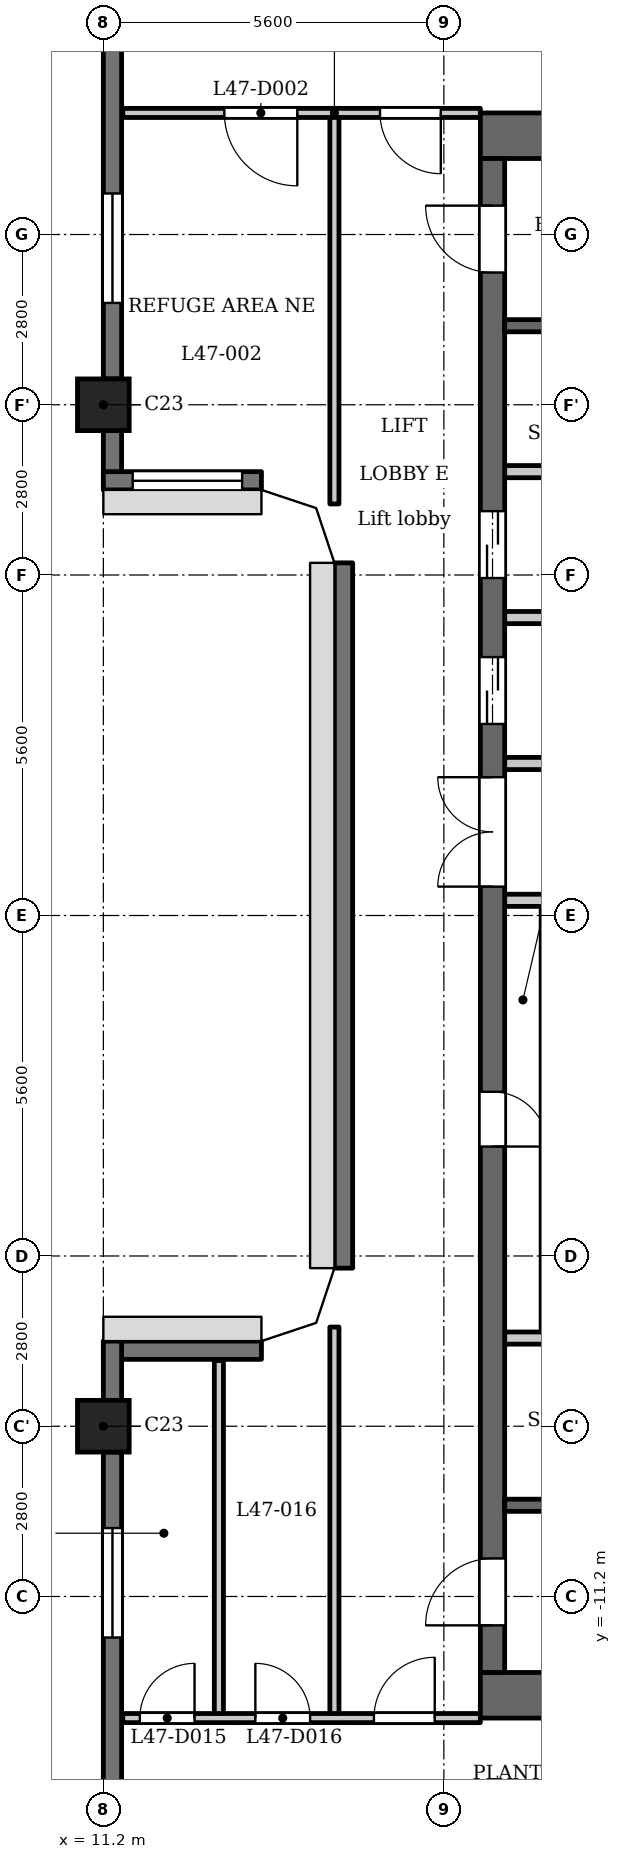
"""IFC4 building model, lengths in metres.
Left out: names, types, materials, properties, quantities, classifications, styles, units other than length and angle.
Written with IfcOpenShell. Run it as: python <this file> out.ifc"""

import sys

from ifc_helpers import new_model, si_unit, direction, frame, frame_2d, origin, origin_2d, place, context, subcontext, project, spatial, polyline, rectangle, outline, extrude, element, fill, save


model = new_model("IFC4")
c1 = context("Model", 3, precision=1e-05, world=origin(), true_north=direction((0.0, 1.0)))
c2 = subcontext(c1, "Body", "Model", "MODEL_VIEW")
j1 = project(units=[si_unit("LENGTHUNIT", "METRE"), si_unit("PLANEANGLEUNIT", "RADIAN")], contexts=[c1])
p1 = place(None, origin())
s1 = spatial("IfcSite", under=j1, at=p1, CompositionType="ELEMENT")
p2 = place(p1, origin())
s2 = spatial("IfcBuilding", under=s1, at=p2, CompositionType="ELEMENT")
p3 = place(p2, frame((0.0, 0.0, 183.5)))
s3 = spatial("IfcBuildingStorey", under=s2, at=p3, CompositionType="ELEMENT", Elevation=183.5)
for number, where, z_axis, x_axis in (
    (1, (11.2, -8.4, 0.0), (0.0, 0.0, 1.0), (1.0, 0.0, 0.0)),
    (2, (11.2, 8.4, 0.0), (0.0, 0.0, 1.0), (1.0, 0.0, 0.0)),
):
    element("IfcColumn", number, at=place(p3, frame(where, z_axis=z_axis, x_axis=x_axis)), inside=s3, PredefinedType="COLUMN", context=c2, shape_type="SweptSolid", body=[
        extrude(rectangle(XDim=0.85, YDim=0.85, at=origin_2d()), origin(), (0.0, 0.0, 1.0), 5.4),
    ])
p4 = place(p3, frame((13.8, -7.15, 0.0), z_axis=(0.0, 0.0, 1.0), x_axis=(-1.0, 0.0, 0.0)))
e3 = element("IfcWall", 3, at=p4, inside=s3, PredefinedType="SOLIDWALL", context=c2, shape_type="SweptSolid", body=[
    extrude(rectangle(XDim=2.6, YDim=0.3, at=frame_2d((1.3, 0.0))), origin(), (0.0, 0.0, 1.0), 4.6),
])
p5 = place(p3, frame((11.35, -7.0, 0.0), z_axis=(0.0, 0.0, 1.0), x_axis=(0.0, -1.0, 0.0)))
e4 = element("IfcWall", 4, at=p5, inside=s3, PredefinedType="SOLIDWALL", context=c2, shape_type="SweptSolid", body=[
    extrude(rectangle(XDim=0.975, YDim=0.3, at=frame_2d((0.488, 0.0))), origin(), (0.0, 0.0, 1.0), 4.6),
])
p6 = place(p3, frame((11.35, -8.825, 0.0), z_axis=(0.0, 0.0, 1.0), x_axis=(0.0, -1.0, 0.0)))
e5 = element("IfcWall", 5, at=p6, inside=s3, PredefinedType="SOLIDWALL", context=c2, shape_type="SweptSolid", body=[
    extrude(rectangle(XDim=6.2, YDim=0.3, at=frame_2d((3.1, 0.0))), origin(), (0.0, 0.0, 1.0), 4.6),
])
p7 = place(p6, frame((1.25, 0.0, 0.9)))
e6 = element("IfcOpeningElement", 6, at=p7, cuts=e5, PredefinedType="OPENING", context=c2, shape_type="SweptSolid", body=[
    extrude(rectangle(XDim=1.8, YDim=1.5, at=frame_2d((0.9, 0.75))), frame((0.0, 0.16, 0.0), z_axis=(0.0, -1.0, 0.0), x_axis=(1.0, 0.0, 0.0)), (0.0, 0.0, 1.0), 0.32),
])
p8 = place(p3, frame((11.35, 15.025, 0.0), z_axis=(0.0, 0.0, 1.0), x_axis=(0.0, -1.0, 0.0)))
e7 = element("IfcWall", 7, at=p8, inside=s3, PredefinedType="SOLIDWALL", context=c2, shape_type="SweptSolid", body=[
    extrude(rectangle(XDim=6.2, YDim=0.3, at=frame_2d((3.1, 0.0))), origin(), (0.0, 0.0, 1.0), 4.6),
])
p9 = place(p8, frame((3.15, 0.0, 0.9)))
e8 = element("IfcOpeningElement", 8, at=p9, cuts=e7, PredefinedType="OPENING", context=c2, shape_type="SweptSolid", body=[
    extrude(rectangle(XDim=1.8, YDim=1.5, at=frame_2d((0.9, 0.75))), frame((0.0, 0.16, 0.0), z_axis=(0.0, -1.0, 0.0), x_axis=(1.0, 0.0, 0.0)), (0.0, 0.0, 1.0), 0.32),
])
p10 = place(p3, frame((11.35, 7.975, 0.0), z_axis=(0.0, 0.0, 1.0), x_axis=(0.0, -1.0, 0.0)))
e9 = element("IfcWall", 9, at=p10, inside=s3, PredefinedType="SOLIDWALL", context=c2, shape_type="SweptSolid", body=[
    extrude(rectangle(XDim=0.975, YDim=0.3, at=frame_2d((0.488, 0.0))), origin(), (0.0, 0.0, 1.0), 4.6),
])
p11 = place(p3, frame((11.2, 7.15, 0.0), z_axis=(0.0, 0.0, 1.0), x_axis=(1.0, 0.0, 0.0)))
e10 = element("IfcWall", 10, at=p11, inside=s3, PredefinedType="SOLIDWALL", context=c2, shape_type="SweptSolid", body=[
    extrude(rectangle(XDim=2.6, YDim=0.3, at=frame_2d((1.3, 0.0))), origin(), (0.0, 0.0, 1.0), 4.6),
])
p12 = place(p11, frame((0.482, 0.0, 0.9)))
e11 = element("IfcOpeningElement", 11, at=p12, cuts=e10, PredefinedType="OPENING", context=c2, shape_type="SweptSolid", body=[
    extrude(rectangle(XDim=1.8, YDim=1.5, at=frame_2d((0.9, 0.75))), frame((0.0, 0.16, 0.0), z_axis=(0.0, -1.0, 0.0), x_axis=(1.0, 0.0, 0.0)), (0.0, 0.0, 1.0), 0.32),
])
p13 = place(p3, frame((15.15, 5.8, 0.0), z_axis=(0.0, 0.0, 1.0), x_axis=(0.0, -1.0, 0.0)))
e12 = element("IfcWall", 12, at=p13, inside=s3, PredefinedType="SOLIDWALL", context=c2, shape_type="SweptSolid", body=[
    extrude(rectangle(XDim=11.6, YDim=0.3, at=frame_2d((5.8, 0.0))), origin(), (0.0, 0.0, 1.0), 4.6),
])
for number, where, z_axis, x_axis in (
    (13, (17.4, 12.825, 0.0), (0.0, 0.0, 1.0), (1.0, 0.0, 0.0)),
    (14, (17.4, -12.825, 0.0), (0.0, 0.0, 1.0), (1.0, 0.0, 0.0)),
):
    element("IfcWall", number, at=place(p3, frame(where, z_axis=z_axis, x_axis=x_axis)), inside=s3, PredefinedType="SHEAR", context=c2, shape_type="SweptSolid", body=[
        extrude(rectangle(XDim=10.4, YDim=0.75, at=frame_2d((5.2, 0.0))), origin(), (0.0, 0.0, 1.0), 4.6),
    ])
p14 = place(p3, frame((17.6, -12.45, 0.0), z_axis=(0.0, 0.0, 1.0), x_axis=(0.0, 1.0, 0.0)))
e15 = element("IfcWall", 15, at=p14, inside=s3, PredefinedType="SHEAR", context=c2, shape_type="SweptSolid", body=[
    extrude(rectangle(XDim=24.9, YDim=0.4, at=frame_2d((12.45, 0.0))), origin(), (0.0, 0.0, 1.0), 4.6),
])
p15 = place(p14, frame((8.65, 0.0, 0.0)))
e16 = element("IfcOpeningElement", 16, at=p15, cuts=e15, PredefinedType="OPENING", context=c2, shape_type="SweptSolid", body=[
    extrude(rectangle(XDim=0.9, YDim=2.1, at=frame_2d((0.45, 1.05))), frame((0.0, 0.21, 0.0), z_axis=(0.0, -1.0, 0.0), x_axis=(1.0, 0.0, 0.0)), (0.0, 0.0, 1.0), 0.42),
])
p16 = place(p14, frame((15.6, 0.0, 0.0)))
e17 = element("IfcOpeningElement", 17, at=p16, cuts=e15, PredefinedType="OPENING", context=c2, shape_type="SweptSolid", body=[
    extrude(rectangle(XDim=1.1, YDim=2.1, at=frame_2d((0.55, 1.05))), frame((0.0, 0.21, 0.0), z_axis=(0.0, -1.0, 0.0), x_axis=(1.0, 0.0, 0.0)), (0.0, 0.0, 1.0), 0.42),
])
p17 = place(p14, frame((18.0, 0.0, 0.0)))
e18 = element("IfcOpeningElement", 18, at=p17, cuts=e15, PredefinedType="OPENING", context=c2, shape_type="SweptSolid", body=[
    extrude(rectangle(XDim=1.1, YDim=2.1, at=frame_2d((0.55, 1.05))), frame((0.0, 0.21, 0.0), z_axis=(0.0, -1.0, 0.0), x_axis=(1.0, 0.0, 0.0)), (0.0, 0.0, 1.0), 0.42),
])
p18 = place(p14, frame((23.025, 0.0, 0.0)))
e19 = element("IfcOpeningElement", 19, at=p18, cuts=e15, PredefinedType="OPENING", context=c2, shape_type="SweptSolid", body=[
    extrude(rectangle(XDim=1.1, YDim=2.1, at=frame_2d((0.55, 1.05))), frame((0.0, 0.21, 0.0), z_axis=(0.0, -1.0, 0.0), x_axis=(1.0, 0.0, 0.0)), (0.0, 0.0, 1.0), 0.42),
])
p19 = place(p14, frame((0.775, 0.0, 0.0)))
e20 = element("IfcOpeningElement", 20, at=p19, cuts=e15, PredefinedType="OPENING", context=c2, shape_type="SweptSolid", body=[
    extrude(rectangle(XDim=1.1, YDim=2.1, at=frame_2d((0.55, 1.05))), frame((0.0, 0.21, 0.0), z_axis=(0.0, -1.0, 0.0), x_axis=(1.0, 0.0, 0.0)), (0.0, 0.0, 1.0), 0.42),
])
p20 = place(p14, frame((12.925, 0.0, 0.0)))
e21 = element("IfcOpeningElement", 21, at=p20, cuts=e15, PredefinedType="OPENING", context=c2, shape_type="SweptSolid", body=[
    extrude(rectangle(XDim=1.8, YDim=2.1, at=frame_2d((0.9, 1.05))), frame((0.0, 0.21, 0.0), z_axis=(0.0, -1.0, 0.0), x_axis=(1.0, 0.0, 0.0)), (0.0, 0.0, 1.0), 0.42),
])
p21 = place(p3, frame((17.8, -9.7, 0.0), z_axis=(0.0, 0.0, 1.0), x_axis=(1.0, 0.0, 0.0)))
e22 = element("IfcWall", 22, at=p21, inside=s3, PredefinedType="SHEAR", context=c2, shape_type="SweptSolid", body=[
    extrude(rectangle(XDim=8.45, YDim=0.2, at=frame_2d((4.225, 0.0))), origin(), (0.0, 0.0, 1.0), 4.6),
])
p22 = place(p21, frame((0.85, 0.0, 0.0)))
e23 = element("IfcOpeningElement", 23, at=p22, cuts=e22, PredefinedType="OPENING", context=c2, shape_type="SweptSolid", body=[
    extrude(rectangle(XDim=1.1, YDim=2.1, at=frame_2d((0.55, 1.05))), frame((0.0, 0.11, 0.0), z_axis=(0.0, -1.0, 0.0), x_axis=(1.0, 0.0, 0.0)), (0.0, 0.0, 1.0), 0.22),
])
p23 = place(p21, frame((3.75, 0.0, 0.0)))
e24 = element("IfcOpeningElement", 24, at=p23, cuts=e22, PredefinedType="OPENING", context=c2, shape_type="SweptSolid", body=[
    extrude(rectangle(XDim=1.1, YDim=2.1, at=frame_2d((0.55, 1.05))), frame((0.0, 0.11, 0.0), z_axis=(0.0, -1.0, 0.0), x_axis=(1.0, 0.0, 0.0)), (0.0, 0.0, 1.0), 0.22),
])
p24 = place(p3, frame((17.8, -6.95, 0.0), z_axis=(0.0, 0.0, 1.0), x_axis=(1.0, 0.0, 0.0)))
e25 = element("IfcWall", 25, at=p24, inside=s3, PredefinedType="PARTITIONING", context=c2, shape_type="SweptSolid", body=[
    extrude(rectangle(XDim=2.8, YDim=0.2, at=frame_2d((1.4, 0.0))), origin(), (0.0, 0.0, 1.0), 4.6),
])
p25 = place(p3, frame((17.8, 0.25, 0.0), z_axis=(0.0, 0.0, 1.0), x_axis=(1.0, 0.0, 0.0)))
e26 = element("IfcWall", 26, at=p25, inside=s3, PredefinedType="PARTITIONING", context=c2, shape_type="SweptSolid", body=[
    extrude(rectangle(XDim=3.0, YDim=0.2, at=frame_2d((1.5, 0.0))), origin(), (0.0, 0.0, 1.0), 4.6),
])
p26 = place(p25, frame((1.35, 0.0, 0.0)))
e27 = element("IfcOpeningElement", 27, at=p26, cuts=e26, PredefinedType="OPENING", context=c2, shape_type="SweptSolid", body=[
    extrude(rectangle(XDim=0.9, YDim=2.1, at=frame_2d((0.45, 1.05))), frame((0.0, 0.11, 0.0), z_axis=(0.0, -1.0, 0.0), x_axis=(1.0, 0.0, 0.0)), (0.0, 0.0, 1.0), 0.22),
])
p27 = place(p3, frame((17.8, 2.5, 0.0), z_axis=(0.0, 0.0, 1.0), x_axis=(1.0, 0.0, 0.0)))
e28 = element("IfcWall", 28, at=p27, inside=s3, PredefinedType="PARTITIONING", context=c2, shape_type="SweptSolid", body=[
    extrude(rectangle(XDim=3.0, YDim=0.2, at=frame_2d((1.5, 0.0))), origin(), (0.0, 0.0, 1.0), 4.6),
])
for number, where, z_axis, x_axis in (
    (29, (17.8, 4.9, 0.0), (0.0, 0.0, 1.0), (1.0, 0.0, 0.0)),
    (30, (17.8, 7.3, 0.0), (0.0, 0.0, 1.0), (1.0, 0.0, 0.0)),
):
    element("IfcWall", number, at=place(p3, frame(where, z_axis=z_axis, x_axis=x_axis)), inside=s3, PredefinedType="PARTITIONING", context=c2, shape_type="SweptSolid", body=[
        extrude(rectangle(XDim=2.8, YDim=0.2, at=frame_2d((1.4, 0.0))), origin(), (0.0, 0.0, 1.0), 4.6),
    ])
p28 = place(p3, frame((17.8, 9.7, 0.0), z_axis=(0.0, 0.0, 1.0), x_axis=(1.0, 0.0, 0.0)))
e31 = element("IfcWall", 31, at=p28, inside=s3, PredefinedType="SHEAR", context=c2, shape_type="SweptSolid", body=[
    extrude(rectangle(XDim=8.45, YDim=0.2, at=frame_2d((4.225, 0.0))), origin(), (0.0, 0.0, 1.0), 4.6),
])
p29 = place(p28, frame((0.85, 0.0, 0.0)))
e32 = element("IfcOpeningElement", 32, at=p29, cuts=e31, PredefinedType="OPENING", context=c2, shape_type="SweptSolid", body=[
    extrude(rectangle(XDim=1.1, YDim=2.1, at=frame_2d((0.55, 1.05))), frame((0.0, 0.11, 0.0), z_axis=(0.0, -1.0, 0.0), x_axis=(1.0, 0.0, 0.0)), (0.0, 0.0, 1.0), 0.22),
])
p30 = place(p28, frame((3.75, 0.0, 0.0)))
e33 = element("IfcOpeningElement", 33, at=p30, cuts=e31, PredefinedType="OPENING", context=c2, shape_type="SweptSolid", body=[
    extrude(rectangle(XDim=1.1, YDim=2.1, at=frame_2d((0.55, 1.05))), frame((0.0, 0.11, 0.0), z_axis=(0.0, -1.0, 0.0), x_axis=(1.0, 0.0, 0.0)), (0.0, 0.0, 1.0), 0.22),
])
p31 = place(p3, frame((11.52, -13.2, 0.0), z_axis=(0.0, 0.0, 1.0), x_axis=(1.0, 0.0, 0.0)))
e34 = element("IfcWall", 34, at=p31, inside=s3, PredefinedType="PARTITIONING", context=c2, shape_type="SweptSolid", body=[
    extrude(rectangle(XDim=5.88, YDim=0.15, at=frame_2d((2.94, 0.0))), origin(), (0.0, 0.0, 1.0), 4.6),
])
p32 = place(p31, frame((4.13, 0.0, 0.0)))
e35 = element("IfcOpeningElement", 35, at=p32, cuts=e34, PredefinedType="OPENING", context=c2, shape_type="SweptSolid", body=[
    extrude(rectangle(XDim=1.0, YDim=2.1, at=frame_2d((0.5, 1.05))), frame((0.0, 0.085, 0.0), z_axis=(0.0, -1.0, 0.0), x_axis=(1.0, 0.0, 0.0)), (0.0, 0.0, 1.0), 0.17),
])
p33 = place(p31, frame((0.28, 0.0, 0.0)))
e36 = element("IfcOpeningElement", 36, at=p33, cuts=e34, PredefinedType="OPENING", context=c2, shape_type="SweptSolid", body=[
    extrude(rectangle(XDim=0.9, YDim=2.1, at=frame_2d((0.45, 1.05))), frame((0.0, 0.085, 0.0), z_axis=(0.0, -1.0, 0.0), x_axis=(1.0, 0.0, 0.0)), (0.0, 0.0, 1.0), 0.17),
])
p34 = place(p31, frame((2.18, 0.0, 0.0)))
e37 = element("IfcOpeningElement", 37, at=p34, cuts=e34, PredefinedType="OPENING", context=c2, shape_type="SweptSolid", body=[
    extrude(rectangle(XDim=0.9, YDim=2.1, at=frame_2d((0.45, 1.05))), frame((0.0, 0.085, 0.0), z_axis=(0.0, -1.0, 0.0), x_axis=(1.0, 0.0, 0.0)), (0.0, 0.0, 1.0), 0.17),
])
p35 = place(p3, frame((11.52, 13.2, 0.0), z_axis=(0.0, 0.0, 1.0), x_axis=(1.0, 0.0, 0.0)))
e38 = element("IfcWall", 38, at=p35, inside=s3, PredefinedType="PARTITIONING", context=c2, shape_type="SweptSolid", body=[
    extrude(rectangle(XDim=5.88, YDim=0.15, at=frame_2d((2.94, 0.0))), origin(), (0.0, 0.0, 1.0), 4.6),
])
p36 = place(p35, frame((4.23, 0.0, 0.0)))
e39 = element("IfcOpeningElement", 39, at=p36, cuts=e38, PredefinedType="OPENING", context=c2, shape_type="SweptSolid", body=[
    extrude(rectangle(XDim=1.0, YDim=2.1, at=frame_2d((0.5, 1.05))), frame((0.0, 0.085, 0.0), z_axis=(0.0, -1.0, 0.0), x_axis=(1.0, 0.0, 0.0)), (0.0, 0.0, 1.0), 0.17),
])
p37 = place(p35, frame((1.67, 0.0, 0.0)))
e40 = element("IfcOpeningElement", 40, at=p37, cuts=e38, PredefinedType="OPENING", context=c2, shape_type="SweptSolid", body=[
    extrude(rectangle(XDim=1.2, YDim=2.1, at=frame_2d((0.6, 1.05))), frame((0.0, 0.085, 0.0), z_axis=(0.0, -1.0, 0.0), x_axis=(1.0, 0.0, 0.0)), (0.0, 0.0, 1.0), 0.17),
])
p38 = place(p3, frame((13.1, -13.125, 0.0), z_axis=(0.0, 0.0, 1.0), x_axis=(0.0, 1.0, 0.0)))
e41 = element("IfcWall", 41, at=p38, inside=s3, PredefinedType="PARTITIONING", context=c2, shape_type="SweptSolid", body=[
    extrude(rectangle(XDim=5.805, YDim=0.15, at=frame_2d((2.902, 0.0))), origin(), (0.0, 0.0, 1.0), 4.6),
])
for number, where, z_axis, x_axis in (
    (42, (15.0, -13.125, 0.0), (0.0, 0.0, 1.0), (0.0, 1.0, 0.0)),
    (43, (15.0, 6.769, 0.0), (0.0, 0.0, 1.0), (0.0, 1.0, 0.0)),
):
    element("IfcWall", number, at=place(p3, frame(where, z_axis=z_axis, x_axis=x_axis)), inside=s3, PredefinedType="PARTITIONING", context=c2, shape_type="SweptSolid", body=[
        extrude(rectangle(XDim=6.356, YDim=0.15, at=frame_2d((3.178, 0.0))), origin(), (0.0, 0.0, 1.0), 4.6),
    ])
p39 = place(p3, origin())
e44 = element("IfcWall", 44, at=p39, inside=s3, PredefinedType="SOLIDWALL", context=c2, shape_type="SweptSolid", body=[
    extrude(outline(polyline([(13.8, 7.0), (14.7, 6.7), (15.0, 5.8), (15.3, 5.8), (15.3, 5.849), (14.937, 6.937), (13.849, 7.3), (13.8, 7.3), (13.8, 7.0)])), origin(), (0.0, 0.0, 1.0), 4.6),
])
e45 = element("IfcWall", 45, at=p39, inside=s3, PredefinedType="SOLIDWALL", context=c2, shape_type="SweptSolid", body=[
    extrude(outline(polyline([(15.0, -5.8), (14.7, -6.7), (13.8, -7.0), (13.8, -7.3), (13.849, -7.3), (14.937, -6.937), (15.3, -5.849), (15.3, -5.8), (15.0, -5.8)])), origin(), (0.0, 0.0, 1.0), 4.6),
])
p40 = place(p15, origin())
e46 = element("IfcDoor", 46, at=p40, inside=s3, OperationType="SINGLE_SWING_LEFT", PredefinedType="DOOR", context=c2, shape_type="SweptSolid", body=[
    extrude(rectangle(XDim=0.9, YDim=2.1, at=frame_2d((0.45, 1.05))), frame((0.0, 0.025, 0.0), z_axis=(0.0, -1.0, 0.0), x_axis=(1.0, 0.0, 0.0)), (0.0, 0.0, 1.0), 0.05),
])
fill(e16, e46)
p41 = place(p16, origin())
e47 = element("IfcDoor", 47, at=p41, inside=s3, OperationType="DOUBLE_DOOR_SLIDING", PredefinedType="DOOR", context=c2, shape_type="SweptSolid", body=[
    extrude(rectangle(XDim=1.1, YDim=2.1, at=frame_2d((0.55, 1.05))), frame((0.0, 0.025, 0.0), z_axis=(0.0, -1.0, 0.0), x_axis=(1.0, 0.0, 0.0)), (0.0, 0.0, 1.0), 0.05),
])
fill(e17, e47)
p42 = place(p17, origin())
e48 = element("IfcDoor", 48, at=p42, inside=s3, OperationType="DOUBLE_DOOR_SLIDING", PredefinedType="DOOR", context=c2, shape_type="SweptSolid", body=[
    extrude(rectangle(XDim=1.1, YDim=2.1, at=frame_2d((0.55, 1.05))), frame((0.0, 0.025, 0.0), z_axis=(0.0, -1.0, 0.0), x_axis=(1.0, 0.0, 0.0)), (0.0, 0.0, 1.0), 0.05),
])
fill(e18, e48)
p43 = place(p18, origin())
e49 = element("IfcDoor", 49, at=p43, inside=s3, OperationType="SINGLE_SWING_LEFT", PredefinedType="DOOR", context=c2, shape_type="SweptSolid", body=[
    extrude(rectangle(XDim=1.1, YDim=2.1, at=frame_2d((0.55, 1.05))), frame((0.0, 0.025, 0.0), z_axis=(0.0, -1.0, 0.0), x_axis=(1.0, 0.0, 0.0)), (0.0, 0.0, 1.0), 0.05),
])
fill(e19, e49)
p44 = place(p19, origin())
e50 = element("IfcDoor", 50, at=p44, inside=s3, OperationType="SINGLE_SWING_RIGHT", PredefinedType="DOOR", context=c2, shape_type="SweptSolid", body=[
    extrude(rectangle(XDim=1.1, YDim=2.1, at=frame_2d((0.55, 1.05))), frame((0.0, 0.025, 0.0), z_axis=(0.0, -1.0, 0.0), x_axis=(1.0, 0.0, 0.0)), (0.0, 0.0, 1.0), 0.05),
])
fill(e20, e50)
p45 = place(p20, origin())
e51 = element("IfcDoor", 51, at=p45, inside=s3, OperationType="DOUBLE_DOOR_SINGLE_SWING", PredefinedType="DOOR", context=c2, shape_type="SweptSolid", body=[
    extrude(rectangle(XDim=1.8, YDim=2.1, at=frame_2d((0.9, 1.05))), frame((0.0, 0.025, 0.0), z_axis=(0.0, -1.0, 0.0), x_axis=(1.0, 0.0, 0.0)), (0.0, 0.0, 1.0), 0.05),
])
fill(e21, e51)
p46 = place(p36, origin())
e52 = element("IfcDoor", 52, at=p46, inside=s3, OperationType="SINGLE_SWING_RIGHT", PredefinedType="DOOR", context=c2, shape_type="SweptSolid", body=[
    extrude(rectangle(XDim=1.0, YDim=2.1, at=frame_2d((0.5, 1.05))), frame((0.0, 0.025, 0.0), z_axis=(0.0, -1.0, 0.0), x_axis=(1.0, 0.0, 0.0)), (0.0, 0.0, 1.0), 0.05),
])
fill(e39, e52)
p47 = place(p37, origin())
e53 = element("IfcDoor", 53, at=p47, inside=s3, OperationType="SINGLE_SWING_RIGHT", PredefinedType="DOOR", context=c2, shape_type="SweptSolid", body=[
    extrude(rectangle(XDim=1.2, YDim=2.1, at=frame_2d((0.6, 1.05))), frame((0.0, 0.025, 0.0), z_axis=(0.0, -1.0, 0.0), x_axis=(1.0, 0.0, 0.0)), (0.0, 0.0, 1.0), 0.05),
])
fill(e40, e53)
p48 = place(p32, origin())
e54 = element("IfcDoor", 54, at=p48, inside=s3, OperationType="SINGLE_SWING_LEFT", PredefinedType="DOOR", context=c2, shape_type="SweptSolid", body=[
    extrude(rectangle(XDim=1.0, YDim=2.1, at=frame_2d((0.5, 1.05))), frame((0.0, 0.025, 0.0), z_axis=(0.0, -1.0, 0.0), x_axis=(1.0, 0.0, 0.0)), (0.0, 0.0, 1.0), 0.05),
])
fill(e35, e54)
p49 = place(p33, origin())
e55 = element("IfcDoor", 55, at=p49, inside=s3, OperationType="SINGLE_SWING_LEFT", PredefinedType="DOOR", context=c2, shape_type="SweptSolid", body=[
    extrude(rectangle(XDim=0.9, YDim=2.1, at=frame_2d((0.45, 1.05))), frame((0.0, 0.025, 0.0), z_axis=(0.0, -1.0, 0.0), x_axis=(1.0, 0.0, 0.0)), (0.0, 0.0, 1.0), 0.05),
])
fill(e36, e55)
p50 = place(p34, origin())
e56 = element("IfcDoor", 56, at=p50, inside=s3, OperationType="SINGLE_SWING_RIGHT", PredefinedType="DOOR", context=c2, shape_type="SweptSolid", body=[
    extrude(rectangle(XDim=0.9, YDim=2.1, at=frame_2d((0.45, 1.05))), frame((0.0, 0.025, 0.0), z_axis=(0.0, -1.0, 0.0), x_axis=(1.0, 0.0, 0.0)), (0.0, 0.0, 1.0), 0.05),
])
fill(e37, e56)
p51 = place(p7, origin())
e57 = element("IfcWindow", 57, at=p51, inside=s3, PartitioningType="SINGLE_PANEL", PredefinedType="WINDOW", context=c2, shape_type="SweptSolid", body=[
    extrude(rectangle(XDim=1.8, YDim=1.5, at=frame_2d((0.9, 0.75))), frame((0.0, 0.03, 0.0), z_axis=(0.0, -1.0, 0.0), x_axis=(1.0, 0.0, 0.0)), (0.0, 0.0, 1.0), 0.06),
])
fill(e6, e57)
p52 = place(p9, origin())
e58 = element("IfcWindow", 58, at=p52, inside=s3, PartitioningType="SINGLE_PANEL", PredefinedType="WINDOW", context=c2, shape_type="SweptSolid", body=[
    extrude(rectangle(XDim=1.8, YDim=1.5, at=frame_2d((0.9, 0.75))), frame((0.0, 0.03, 0.0), z_axis=(0.0, -1.0, 0.0), x_axis=(1.0, 0.0, 0.0)), (0.0, 0.0, 1.0), 0.06),
])
fill(e8, e58)
p53 = place(p12, origin())
e59 = element("IfcWindow", 59, at=p53, inside=s3, PartitioningType="SINGLE_PANEL", PredefinedType="WINDOW", context=c2, shape_type="SweptSolid", body=[
    extrude(rectangle(XDim=1.8, YDim=1.5, at=frame_2d((0.9, 0.75))), frame((0.0, 0.03, 0.0), z_axis=(0.0, -1.0, 0.0), x_axis=(1.0, 0.0, 0.0)), (0.0, 0.0, 1.0), 0.06),
])
fill(e11, e59)
save(model, sys.argv[1])
